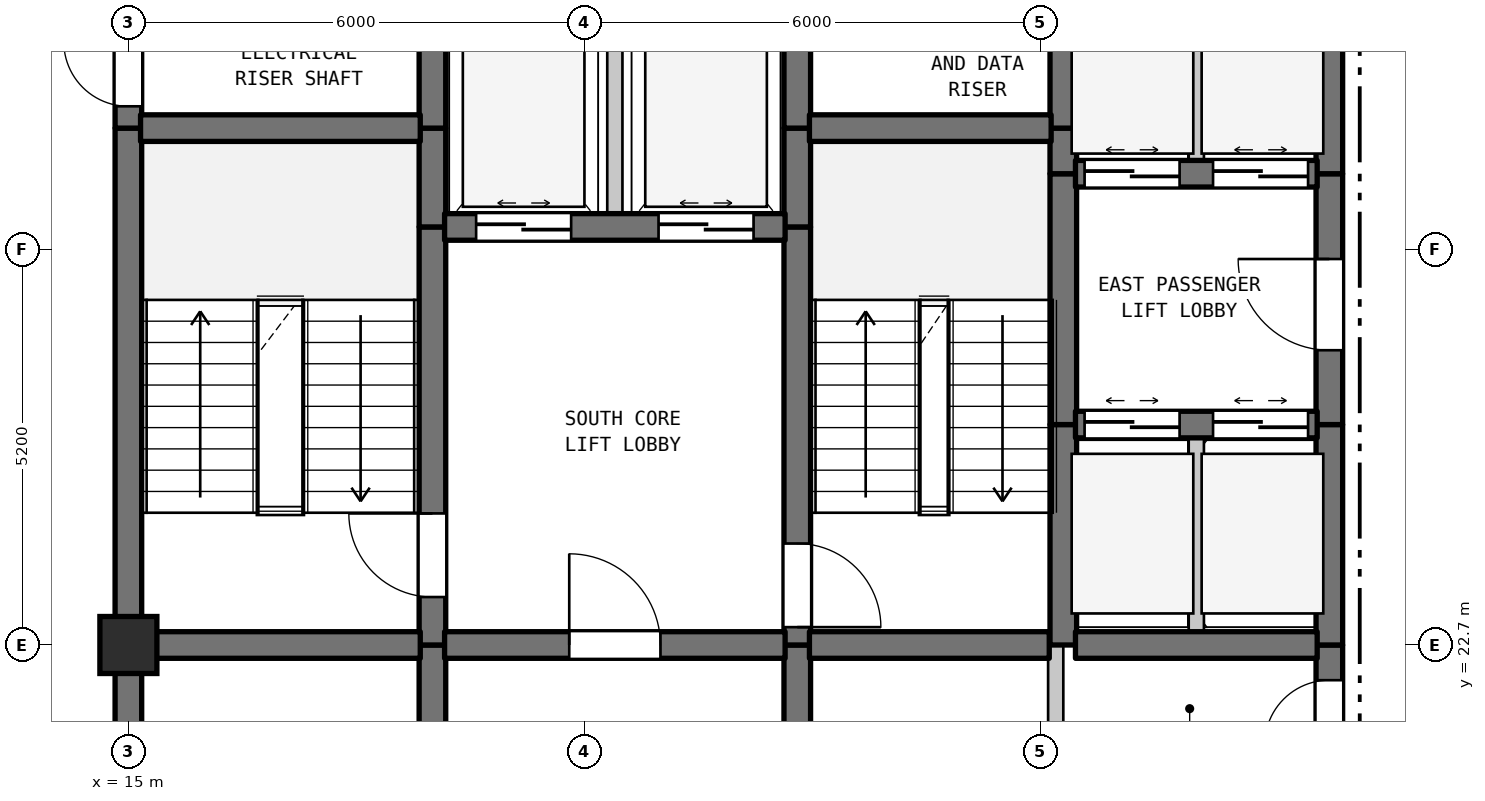
"""IFC4 building model, lengths in metres.
Left out: names, types, materials, properties, quantities, classifications, styles, units other than length and angle.
Written with IfcOpenShell. Run it as: python <this file> out.ifc"""

import sys

from ifc_helpers import new_model, si_unit, direction, frame, frame_2d, origin, origin_2d, place, context, subcontext, project, spatial, rectangle, extrude, element, fill, save


model = new_model("IFC4")
c1 = context("Model", 3, precision=1e-05, world=origin(), true_north=direction((0.0, 1.0)))
c2 = subcontext(c1, "Body", "Model", "MODEL_VIEW")
j1 = project(units=[si_unit("LENGTHUNIT", "METRE"), si_unit("PLANEANGLEUNIT", "RADIAN")], contexts=[c1])
p1 = place(None, origin())
s1 = spatial("IfcSite", under=j1, at=p1, CompositionType="ELEMENT")
p2 = place(p1, origin())
s2 = spatial("IfcBuilding", under=s1, at=p2, CompositionType="ELEMENT")
p3 = place(p2, frame((0.0, 0.0, 206.9)))
s3 = spatial("IfcBuildingStorey", under=s2, at=p3, CompositionType="ELEMENT", Elevation=206.9)
p4 = place(p3, frame((15.0, 22.7, 0.0), z_axis=(0.0, 0.0, 1.0), x_axis=(1.0, 0.0, 0.0)))
e1 = element("IfcColumn", 1, at=p4, inside=s3, PredefinedType="COLUMN", context=c2, shape_type="SweptSolid", body=[
    extrude(rectangle(XDim=0.75, YDim=0.75, at=origin_2d()), origin(), (0.0, 0.0, 1.0), 3.7),
])
p5 = place(p3, frame((15.0, 19.5, 0.0), z_axis=(0.0, 0.0, 1.0), x_axis=(0.0, 1.0, 0.0)))
e2 = element("IfcWall", 2, at=p5, inside=s3, PredefinedType="SHEAR", context=c2, shape_type="SweptSolid", body=[
    extrude(rectangle(XDim=3.2, YDim=0.35, at=frame_2d((1.6, 0.0))), origin(), (0.0, 0.0, 1.0), 3.39),
])
p6 = place(p3, frame((15.0, 22.7, 0.0), z_axis=(0.0, 0.0, 1.0), x_axis=(0.0, 1.0, 0.0)))
e3 = element("IfcWall", 3, at=p6, inside=s3, PredefinedType="SHEAR", context=c2, shape_type="SweptSolid", body=[
    extrude(rectangle(XDim=6.8, YDim=0.35, at=frame_2d((3.4, 0.0))), origin(), (0.0, 0.0, 1.0), 3.39),
])
p7 = place(p3, frame((15.0, 29.5, 0.0), z_axis=(0.0, 0.0, 1.0), x_axis=(0.0, 1.0, 0.0)))
e4 = element("IfcWall", 4, at=p7, inside=s3, PredefinedType="SHEAR", context=c2, shape_type="SweptSolid", body=[
    extrude(rectangle(XDim=1.6, YDim=0.35, at=frame_2d((0.8, 0.0))), origin(), (0.0, 0.0, 1.0), 3.39),
])
p8 = place(p7, frame((0.287, 0.0, 0.0)))
e5 = element("IfcOpeningElement", 5, at=p8, cuts=e4, PredefinedType="OPENING", context=c2, shape_type="SweptSolid", body=[
    extrude(rectangle(XDim=0.85, YDim=2.1, at=frame_2d((0.425, 1.05))), frame((0.0, 0.185, 0.0), z_axis=(0.0, -1.0, 0.0), x_axis=(1.0, 0.0, 0.0)), (0.0, 0.0, 1.0), 0.37),
])
p9 = place(p3, frame((19.0, 19.5, 0.0), z_axis=(0.0, 0.0, 1.0), x_axis=(0.0, 1.0, 0.0)))
e6 = element("IfcWall", 6, at=p9, inside=s3, PredefinedType="SHEAR", context=c2, shape_type="SweptSolid", body=[
    extrude(rectangle(XDim=3.2, YDim=0.35, at=frame_2d((1.6, 0.0))), origin(), (0.0, 0.0, 1.0), 3.39),
])
p10 = place(p3, frame((19.0, 22.7, 0.0), z_axis=(0.0, 0.0, 1.0), x_axis=(0.0, 1.0, 0.0)))
e7 = element("IfcWall", 7, at=p10, inside=s3, PredefinedType="SHEAR", context=c2, shape_type="SweptSolid", body=[
    extrude(rectangle(XDim=5.5, YDim=0.35, at=frame_2d((2.75, 0.0))), origin(), (0.0, 0.0, 1.0), 3.39),
])
p11 = place(p10, frame((0.631, 0.0, 0.0)))
e8 = element("IfcOpeningElement", 8, at=p11, cuts=e7, PredefinedType="OPENING", context=c2, shape_type="SweptSolid", body=[
    extrude(rectangle(XDim=1.1, YDim=2.15, at=frame_2d((0.55, 1.075))), frame((0.0, 0.185, 0.0), z_axis=(0.0, -1.0, 0.0), x_axis=(1.0, 0.0, 0.0)), (0.0, 0.0, 1.0), 0.37),
])
p12 = place(p3, frame((19.0, 28.2, 0.0), z_axis=(0.0, 0.0, 1.0), x_axis=(0.0, 1.0, 0.0)))
e9 = element("IfcWall", 9, at=p12, inside=s3, PredefinedType="SHEAR", context=c2, shape_type="SweptSolid", body=[
    extrude(rectangle(XDim=1.3, YDim=0.35, at=frame_2d((0.65, 0.0))), origin(), (0.0, 0.0, 1.0), 3.39),
])
p13 = place(p3, frame((19.0, 29.5, 0.0), z_axis=(0.0, 0.0, 1.0), x_axis=(0.0, 1.0, 0.0)))
e10 = element("IfcWall", 10, at=p13, inside=s3, PredefinedType="SHEAR", context=c2, shape_type="SweptSolid", body=[
    extrude(rectangle(XDim=5.5, YDim=0.35, at=frame_2d((2.75, 0.0))), origin(), (0.0, 0.0, 1.0), 3.39),
])
p14 = place(p13, frame((2.025, 0.0, 0.0)))
e11 = element("IfcOpeningElement", 11, at=p14, cuts=e10, PredefinedType="OPENING", context=c2, shape_type="SweptSolid", body=[
    extrude(rectangle(XDim=1.1, YDim=2.15, at=frame_2d((0.55, 1.075))), frame((0.0, 0.185, 0.0), z_axis=(0.0, -1.0, 0.0), x_axis=(1.0, 0.0, 0.0)), (0.0, 0.0, 1.0), 0.37),
])
p15 = place(p3, frame((21.4, 28.2, 0.0), z_axis=(0.0, 0.0, 1.0), x_axis=(0.0, 1.0, 0.0)))
e12 = element("IfcWall", 12, at=p15, inside=s3, PredefinedType="STANDARD", context=c2, shape_type="SweptSolid", body=[
    extrude(rectangle(XDim=2.6, YDim=0.2, at=frame_2d((1.3, 0.0))), origin(), (0.0, 0.0, 1.0), 3.39),
])
p16 = place(p3, frame((23.8, 19.5, 0.0), z_axis=(0.0, 0.0, 1.0), x_axis=(0.0, 1.0, 0.0)))
e13 = element("IfcWall", 13, at=p16, inside=s3, PredefinedType="SHEAR", context=c2, shape_type="SweptSolid", body=[
    extrude(rectangle(XDim=3.2, YDim=0.35, at=frame_2d((1.6, 0.0))), origin(), (0.0, 0.0, 1.0), 3.39),
])
p17 = place(p3, frame((23.8, 22.7, 0.0), z_axis=(0.0, 0.0, 1.0), x_axis=(0.0, 1.0, 0.0)))
e14 = element("IfcWall", 14, at=p17, inside=s3, PredefinedType="SHEAR", context=c2, shape_type="SweptSolid", body=[
    extrude(rectangle(XDim=5.5, YDim=0.35, at=frame_2d((2.75, 0.0))), origin(), (0.0, 0.0, 1.0), 3.39),
])
p18 = place(p17, frame((0.235, 0.0, 0.0)))
e15 = element("IfcOpeningElement", 15, at=p18, cuts=e14, PredefinedType="OPENING", context=c2, shape_type="SweptSolid", body=[
    extrude(rectangle(XDim=1.1, YDim=2.15, at=frame_2d((0.55, 1.075))), frame((0.0, 0.185, 0.0), z_axis=(0.0, -1.0, 0.0), x_axis=(1.0, 0.0, 0.0)), (0.0, 0.0, 1.0), 0.37),
])
for number, where, z_axis, x_axis in (
    (16, (23.8, 28.2, 0.0), (0.0, 0.0, 1.0), (0.0, 1.0, 0.0)),
    (17, (23.8, 29.5, 0.0), (0.0, 0.0, 1.0), (0.0, 1.0, 0.0)),
):
    element("IfcWall", number, at=place(p3, frame(where, z_axis=z_axis, x_axis=x_axis)), inside=s3, PredefinedType="SHEAR", context=c2, shape_type="SweptSolid", body=[
        extrude(rectangle(XDim=1.3, YDim=0.35, at=frame_2d((0.65, 0.0))), origin(), (0.0, 0.0, 1.0), 3.39),
    ])
p19 = place(p3, frame((27.2, 21.1, 0.0), z_axis=(0.0, 0.0, 1.0), x_axis=(0.0, 1.0, 0.0)))
e18 = element("IfcWall", 18, at=p19, inside=s3, PredefinedType="STANDARD", context=c2, shape_type="SweptSolid", body=[
    extrude(rectangle(XDim=1.6, YDim=0.2, at=frame_2d((0.8, 0.0))), origin(), (0.0, 0.0, 1.0), 3.39),
])
p20 = place(p3, frame((27.3, 22.7, 0.0), z_axis=(0.0, 0.0, 1.0), x_axis=(0.0, 1.0, 0.0)))
e19 = element("IfcWall", 19, at=p20, inside=s3, PredefinedType="SHEAR", context=c2, shape_type="SweptSolid", body=[
    extrude(rectangle(XDim=2.9, YDim=0.35, at=frame_2d((1.45, 0.0))), origin(), (0.0, 0.0, 1.0), 3.39),
])
p21 = place(p3, frame((27.3, 25.6, 0.0), z_axis=(0.0, 0.0, 1.0), x_axis=(0.0, 1.0, 0.0)))
e20 = element("IfcWall", 20, at=p21, inside=s3, PredefinedType="SHEAR", context=c2, shape_type="SweptSolid", body=[
    extrude(rectangle(XDim=3.3, YDim=0.35, at=frame_2d((1.65, 0.0))), origin(), (0.0, 0.0, 1.0), 3.39),
])
p22 = place(p3, frame((27.3, 28.9, 0.0), z_axis=(0.0, 0.0, 1.0), x_axis=(0.0, 1.0, 0.0)))
e21 = element("IfcWall", 21, at=p22, inside=s3, PredefinedType="SHEAR", context=c2, shape_type="SweptSolid", body=[
    extrude(rectangle(XDim=0.6, YDim=0.35, at=frame_2d((0.3, 0.0))), origin(), (0.0, 0.0, 1.0), 3.39),
])
p23 = place(p3, frame((27.3, 29.5, 0.0), z_axis=(0.0, 0.0, 1.0), x_axis=(0.0, 1.0, 0.0)))
e22 = element("IfcWall", 22, at=p23, inside=s3, PredefinedType="SHEAR", context=c2, shape_type="SweptSolid", body=[
    extrude(rectangle(XDim=2.0, YDim=0.35, at=frame_2d((1.0, 0.0))), origin(), (0.0, 0.0, 1.0), 3.39),
])
p24 = place(p3, frame((29.05, 22.7, 0.0), z_axis=(0.0, 0.0, 1.0), x_axis=(0.0, 1.0, 0.0)))
e23 = element("IfcWall", 23, at=p24, inside=s3, PredefinedType="STANDARD", context=c2, shape_type="SweptSolid", body=[
    extrude(rectangle(XDim=2.9, YDim=0.2, at=frame_2d((1.45, 0.0))), origin(), (0.0, 0.0, 1.0), 3.39),
])
p25 = place(p3, frame((29.05, 28.9, 0.0), z_axis=(0.0, 0.0, 1.0), x_axis=(0.0, 1.0, 0.0)))
e24 = element("IfcWall", 24, at=p25, inside=s3, PredefinedType="STANDARD", context=c2, shape_type="SweptSolid", body=[
    extrude(rectangle(XDim=2.6, YDim=0.2, at=frame_2d((1.3, 0.0))), origin(), (0.0, 0.0, 1.0), 3.39),
])
p26 = place(p3, frame((30.8, 21.1, 0.0), z_axis=(0.0, 0.0, 1.0), x_axis=(0.0, 1.0, 0.0)))
e25 = element("IfcWall", 25, at=p26, inside=s3, PredefinedType="SHEAR", context=c2, shape_type="SweptSolid", body=[
    extrude(rectangle(XDim=1.6, YDim=0.35, at=frame_2d((0.8, 0.0))), origin(), (0.0, 0.0, 1.0), 3.39),
])
p27 = place(p26, frame((0.287, 0.0, 0.0)))
e26 = element("IfcOpeningElement", 26, at=p27, cuts=e25, PredefinedType="OPENING", context=c2, shape_type="SweptSolid", body=[
    extrude(rectangle(XDim=0.85, YDim=2.1, at=frame_2d((0.425, 1.05))), frame((0.0, 0.185, 0.0), z_axis=(0.0, -1.0, 0.0), x_axis=(1.0, 0.0, 0.0)), (0.0, 0.0, 1.0), 0.37),
])
p28 = place(p3, frame((30.8, 22.7, 0.0), z_axis=(0.0, 0.0, 1.0), x_axis=(0.0, 1.0, 0.0)))
e27 = element("IfcWall", 27, at=p28, inside=s3, PredefinedType="SHEAR", context=c2, shape_type="SweptSolid", body=[
    extrude(rectangle(XDim=2.9, YDim=0.35, at=frame_2d((1.45, 0.0))), origin(), (0.0, 0.0, 1.0), 3.39),
])
p29 = place(p3, frame((30.8, 25.6, 0.0), z_axis=(0.0, 0.0, 1.0), x_axis=(0.0, 1.0, 0.0)))
e28 = element("IfcWall", 28, at=p29, inside=s3, PredefinedType="SHEAR", context=c2, shape_type="SweptSolid", body=[
    extrude(rectangle(XDim=3.3, YDim=0.35, at=frame_2d((1.65, 0.0))), origin(), (0.0, 0.0, 1.0), 3.39),
])
p30 = place(p29, frame((0.978, 0.0, 0.0)))
e29 = element("IfcOpeningElement", 29, at=p30, cuts=e28, PredefinedType="OPENING", context=c2, shape_type="SweptSolid", body=[
    extrude(rectangle(XDim=1.2, YDim=2.2, at=frame_2d((0.6, 1.1))), frame((0.0, 0.185, 0.0), z_axis=(0.0, -1.0, 0.0), x_axis=(1.0, 0.0, 0.0)), (0.0, 0.0, 1.0), 0.37),
])
p31 = place(p3, frame((30.8, 28.9, 0.0), z_axis=(0.0, 0.0, 1.0), x_axis=(0.0, 1.0, 0.0)))
e30 = element("IfcWall", 30, at=p31, inside=s3, PredefinedType="SHEAR", context=c2, shape_type="SweptSolid", body=[
    extrude(rectangle(XDim=2.6, YDim=0.35, at=frame_2d((1.3, 0.0))), origin(), (0.0, 0.0, 1.0), 3.39),
])
p32 = place(p3, frame((15.16, 22.7, 0.0), z_axis=(0.0, 0.0, 1.0), x_axis=(1.0, 0.0, 0.0)))
e31 = element("IfcWall", 31, at=p32, inside=s3, PredefinedType="SHEAR", context=c2, shape_type="SweptSolid", body=[
    extrude(rectangle(XDim=3.68, YDim=0.35, at=frame_2d((1.84, 0.0))), origin(), (0.0, 0.0, 1.0), 3.39),
])
p33 = place(p3, frame((19.16, 22.7, 0.0), z_axis=(0.0, 0.0, 1.0), x_axis=(1.0, 0.0, 0.0)))
e32 = element("IfcWall", 32, at=p33, inside=s3, PredefinedType="SHEAR", context=c2, shape_type="SweptSolid", body=[
    extrude(rectangle(XDim=4.48, YDim=0.35, at=frame_2d((2.24, 0.0))), origin(), (0.0, 0.0, 1.0), 3.39),
])
p34 = place(p33, frame((1.64, 0.0, 0.0)))
e33 = element("IfcOpeningElement", 33, at=p34, cuts=e32, PredefinedType="OPENING", context=c2, shape_type="SweptSolid", body=[
    extrude(rectangle(XDim=1.2, YDim=2.2, at=frame_2d((0.6, 1.1))), frame((0.0, 0.185, 0.0), z_axis=(0.0, -1.0, 0.0), x_axis=(1.0, 0.0, 0.0)), (0.0, 0.0, 1.0), 0.37),
])
p35 = place(p3, frame((23.96, 22.7, 0.0), z_axis=(0.0, 0.0, 1.0), x_axis=(1.0, 0.0, 0.0)))
e34 = element("IfcWall", 34, at=p35, inside=s3, PredefinedType="SHEAR", context=c2, shape_type="SweptSolid", body=[
    extrude(rectangle(XDim=3.155, YDim=0.35, at=frame_2d((1.578, 0.0))), origin(), (0.0, 0.0, 1.0), 3.39),
])
p36 = place(p3, frame((27.46, 22.7, 0.0), z_axis=(0.0, 0.0, 1.0), x_axis=(1.0, 0.0, 0.0)))
e35 = element("IfcWall", 35, at=p36, inside=s3, PredefinedType="SHEAR", context=c2, shape_type="SweptSolid", body=[
    extrude(rectangle(XDim=3.18, YDim=0.35, at=frame_2d((1.59, 0.0))), origin(), (0.0, 0.0, 1.0), 3.39),
])
p37 = place(p3, frame((27.46, 25.6, 0.0), z_axis=(0.0, 0.0, 1.0), x_axis=(1.0, 0.0, 0.0)))
e36 = element("IfcWall", 36, at=p37, inside=s3, PredefinedType="SHEAR", context=c2, shape_type="SweptSolid", body=[
    extrude(rectangle(XDim=3.18, YDim=0.35, at=frame_2d((1.59, 0.0))), origin(), (0.0, 0.0, 1.0), 3.39),
])
p38 = place(p37, frame((0.12, 0.0, 0.0)))
e37 = element("IfcOpeningElement", 37, at=p38, cuts=e36, PredefinedType="OPENING", context=c2, shape_type="SweptSolid", body=[
    extrude(rectangle(XDim=1.25, YDim=2.2, at=frame_2d((0.625, 1.1))), frame((0.0, 0.185, 0.0), z_axis=(0.0, -1.0, 0.0), x_axis=(1.0, 0.0, 0.0)), (0.0, 0.0, 1.0), 0.37),
])
p39 = place(p37, frame((1.81, 0.0, 0.0)))
e38 = element("IfcOpeningElement", 38, at=p39, cuts=e36, PredefinedType="OPENING", context=c2, shape_type="SweptSolid", body=[
    extrude(rectangle(XDim=1.25, YDim=2.2, at=frame_2d((0.625, 1.1))), frame((0.0, 0.185, 0.0), z_axis=(0.0, -1.0, 0.0), x_axis=(1.0, 0.0, 0.0)), (0.0, 0.0, 1.0), 0.37),
])
p40 = place(p3, frame((19.16, 28.2, 0.0), z_axis=(0.0, 0.0, 1.0), x_axis=(1.0, 0.0, 0.0)))
e39 = element("IfcWall", 39, at=p40, inside=s3, PredefinedType="SHEAR", context=c2, shape_type="SweptSolid", body=[
    extrude(rectangle(XDim=4.48, YDim=0.35, at=frame_2d((2.24, 0.0))), origin(), (0.0, 0.0, 1.0), 3.39),
])
p41 = place(p40, frame((0.415, 0.0, 0.0)))
e40 = element("IfcOpeningElement", 40, at=p41, cuts=e39, PredefinedType="OPENING", context=c2, shape_type="SweptSolid", body=[
    extrude(rectangle(XDim=1.25, YDim=2.2, at=frame_2d((0.625, 1.1))), frame((0.0, 0.185, 0.0), z_axis=(0.0, -1.0, 0.0), x_axis=(1.0, 0.0, 0.0)), (0.0, 0.0, 1.0), 0.37),
])
p42 = place(p40, frame((2.815, 0.0, 0.0)))
e41 = element("IfcOpeningElement", 41, at=p42, cuts=e39, PredefinedType="OPENING", context=c2, shape_type="SweptSolid", body=[
    extrude(rectangle(XDim=1.25, YDim=2.2, at=frame_2d((0.625, 1.1))), frame((0.0, 0.185, 0.0), z_axis=(0.0, -1.0, 0.0), x_axis=(1.0, 0.0, 0.0)), (0.0, 0.0, 1.0), 0.37),
])
p43 = place(p3, frame((27.46, 28.9, 0.0), z_axis=(0.0, 0.0, 1.0), x_axis=(1.0, 0.0, 0.0)))
e42 = element("IfcWall", 42, at=p43, inside=s3, PredefinedType="SHEAR", context=c2, shape_type="SweptSolid", body=[
    extrude(rectangle(XDim=3.18, YDim=0.35, at=frame_2d((1.59, 0.0))), origin(), (0.0, 0.0, 1.0), 3.39),
])
p44 = place(p43, frame((0.12, 0.0, 0.0)))
e43 = element("IfcOpeningElement", 43, at=p44, cuts=e42, PredefinedType="OPENING", context=c2, shape_type="SweptSolid", body=[
    extrude(rectangle(XDim=1.25, YDim=2.2, at=frame_2d((0.625, 1.1))), frame((0.0, 0.185, 0.0), z_axis=(0.0, -1.0, 0.0), x_axis=(1.0, 0.0, 0.0)), (0.0, 0.0, 1.0), 0.37),
])
p45 = place(p43, frame((1.81, 0.0, 0.0)))
e44 = element("IfcOpeningElement", 44, at=p45, cuts=e42, PredefinedType="OPENING", context=c2, shape_type="SweptSolid", body=[
    extrude(rectangle(XDim=1.25, YDim=2.2, at=frame_2d((0.625, 1.1))), frame((0.0, 0.185, 0.0), z_axis=(0.0, -1.0, 0.0), x_axis=(1.0, 0.0, 0.0)), (0.0, 0.0, 1.0), 0.37),
])
p46 = place(p3, frame((15.16, 29.5, 0.0), z_axis=(0.0, 0.0, 1.0), x_axis=(1.0, 0.0, 0.0)))
e45 = element("IfcWall", 45, at=p46, inside=s3, PredefinedType="SHEAR", context=c2, shape_type="SweptSolid", body=[
    extrude(rectangle(XDim=3.68, YDim=0.35, at=frame_2d((1.84, 0.0))), origin(), (0.0, 0.0, 1.0), 3.39),
])
p47 = place(p3, frame((23.96, 29.5, 0.0), z_axis=(0.0, 0.0, 1.0), x_axis=(1.0, 0.0, 0.0)))
e46 = element("IfcWall", 46, at=p47, inside=s3, PredefinedType="SHEAR", context=c2, shape_type="SweptSolid", body=[
    extrude(rectangle(XDim=3.18, YDim=0.35, at=frame_2d((1.59, 0.0))), origin(), (0.0, 0.0, 1.0), 3.39),
])
p48 = place(p8, origin())
e47 = element("IfcDoor", 47, at=p48, inside=s3, OperationType="SINGLE_SWING_RIGHT", PredefinedType="DOOR", context=c2, shape_type="SweptSolid", body=[
    extrude(rectangle(XDim=0.85, YDim=2.1, at=frame_2d((0.425, 1.05))), frame((0.0, 0.025, 0.0), z_axis=(0.0, -1.0, 0.0), x_axis=(1.0, 0.0, 0.0)), (0.0, 0.0, 1.0), 0.05),
])
fill(e5, e47)
p49 = place(p11, origin())
e48 = element("IfcDoor", 48, at=p49, inside=s3, OperationType="SINGLE_SWING_RIGHT", PredefinedType="DOOR", context=c2, shape_type="SweptSolid", body=[
    extrude(rectangle(XDim=1.1, YDim=2.15, at=frame_2d((0.55, 1.075))), frame((0.0, 0.025, 0.0), z_axis=(0.0, -1.0, 0.0), x_axis=(1.0, 0.0, 0.0)), (0.0, 0.0, 1.0), 0.05),
])
fill(e8, e48)
p50 = place(p18, frame((1.1, 0.0, 0.0), z_axis=(0.0, 0.0, 1.0), x_axis=(-1.0, 0.0, 0.0)))
e49 = element("IfcDoor", 49, at=p50, inside=s3, OperationType="SINGLE_SWING_LEFT", PredefinedType="DOOR", context=c2, shape_type="SweptSolid", body=[
    extrude(rectangle(XDim=1.1, YDim=2.15, at=frame_2d((0.55, 1.075))), frame((0.0, 0.025, 0.0), z_axis=(0.0, -1.0, 0.0), x_axis=(1.0, 0.0, 0.0)), (0.0, 0.0, 1.0), 0.05),
])
fill(e15, e49)
p51 = place(p27, origin())
e50 = element("IfcDoor", 50, at=p51, inside=s3, OperationType="SINGLE_SWING_LEFT", PredefinedType="DOOR", context=c2, shape_type="SweptSolid", body=[
    extrude(rectangle(XDim=0.85, YDim=2.1, at=frame_2d((0.425, 1.05))), frame((0.0, 0.025, 0.0), z_axis=(0.0, -1.0, 0.0), x_axis=(1.0, 0.0, 0.0)), (0.0, 0.0, 1.0), 0.05),
])
fill(e26, e50)
p52 = place(p30, origin())
e51 = element("IfcDoor", 51, at=p52, inside=s3, OperationType="SINGLE_SWING_RIGHT", PredefinedType="DOOR", context=c2, shape_type="SweptSolid", body=[
    extrude(rectangle(XDim=1.2, YDim=2.2, at=frame_2d((0.6, 1.1))), frame((0.0, 0.025, 0.0), z_axis=(0.0, -1.0, 0.0), x_axis=(1.0, 0.0, 0.0)), (0.0, 0.0, 1.0), 0.05),
])
fill(e29, e51)
p53 = place(p34, origin())
e52 = element("IfcDoor", 52, at=p53, inside=s3, OperationType="SINGLE_SWING_LEFT", PredefinedType="DOOR", context=c2, shape_type="SweptSolid", body=[
    extrude(rectangle(XDim=1.2, YDim=2.2, at=frame_2d((0.6, 1.1))), frame((0.0, 0.025, 0.0), z_axis=(0.0, -1.0, 0.0), x_axis=(1.0, 0.0, 0.0)), (0.0, 0.0, 1.0), 0.05),
])
fill(e33, e52)
p54 = place(p38, origin())
e53 = element("IfcDoor", 53, at=p54, inside=s3, OperationType="DOUBLE_DOOR_SLIDING", PredefinedType="DOOR", context=c2, shape_type="SweptSolid", body=[
    extrude(rectangle(XDim=1.25, YDim=2.2, at=frame_2d((0.625, 1.1))), frame((0.0, 0.025, 0.0), z_axis=(0.0, -1.0, 0.0), x_axis=(1.0, 0.0, 0.0)), (0.0, 0.0, 1.0), 0.05),
])
fill(e37, e53)
p55 = place(p39, origin())
e54 = element("IfcDoor", 54, at=p55, inside=s3, OperationType="DOUBLE_DOOR_SLIDING", PredefinedType="DOOR", context=c2, shape_type="SweptSolid", body=[
    extrude(rectangle(XDim=1.25, YDim=2.2, at=frame_2d((0.625, 1.1))), frame((0.0, 0.025, 0.0), z_axis=(0.0, -1.0, 0.0), x_axis=(1.0, 0.0, 0.0)), (0.0, 0.0, 1.0), 0.05),
])
fill(e38, e54)
p56 = place(p41, origin())
e55 = element("IfcDoor", 55, at=p56, inside=s3, OperationType="DOUBLE_DOOR_SLIDING", PredefinedType="DOOR", context=c2, shape_type="SweptSolid", body=[
    extrude(rectangle(XDim=1.25, YDim=2.2, at=frame_2d((0.625, 1.1))), frame((0.0, 0.025, 0.0), z_axis=(0.0, -1.0, 0.0), x_axis=(1.0, 0.0, 0.0)), (0.0, 0.0, 1.0), 0.05),
])
fill(e40, e55)
p57 = place(p42, origin())
e56 = element("IfcDoor", 56, at=p57, inside=s3, OperationType="DOUBLE_DOOR_SLIDING", PredefinedType="DOOR", context=c2, shape_type="SweptSolid", body=[
    extrude(rectangle(XDim=1.25, YDim=2.2, at=frame_2d((0.625, 1.1))), frame((0.0, 0.025, 0.0), z_axis=(0.0, -1.0, 0.0), x_axis=(1.0, 0.0, 0.0)), (0.0, 0.0, 1.0), 0.05),
])
fill(e41, e56)
p58 = place(p44, origin())
e57 = element("IfcDoor", 57, at=p58, inside=s3, OperationType="DOUBLE_DOOR_SLIDING", PredefinedType="DOOR", context=c2, shape_type="SweptSolid", body=[
    extrude(rectangle(XDim=1.25, YDim=2.2, at=frame_2d((0.625, 1.1))), frame((0.0, 0.025, 0.0), z_axis=(0.0, -1.0, 0.0), x_axis=(1.0, 0.0, 0.0)), (0.0, 0.0, 1.0), 0.05),
])
fill(e43, e57)
p59 = place(p45, origin())
e58 = element("IfcDoor", 58, at=p59, inside=s3, OperationType="DOUBLE_DOOR_SLIDING", PredefinedType="DOOR", context=c2, shape_type="SweptSolid", body=[
    extrude(rectangle(XDim=1.25, YDim=2.2, at=frame_2d((0.625, 1.1))), frame((0.0, 0.025, 0.0), z_axis=(0.0, -1.0, 0.0), x_axis=(1.0, 0.0, 0.0)), (0.0, 0.0, 1.0), 0.05),
])
fill(e44, e58)
save(model, sys.argv[1])
